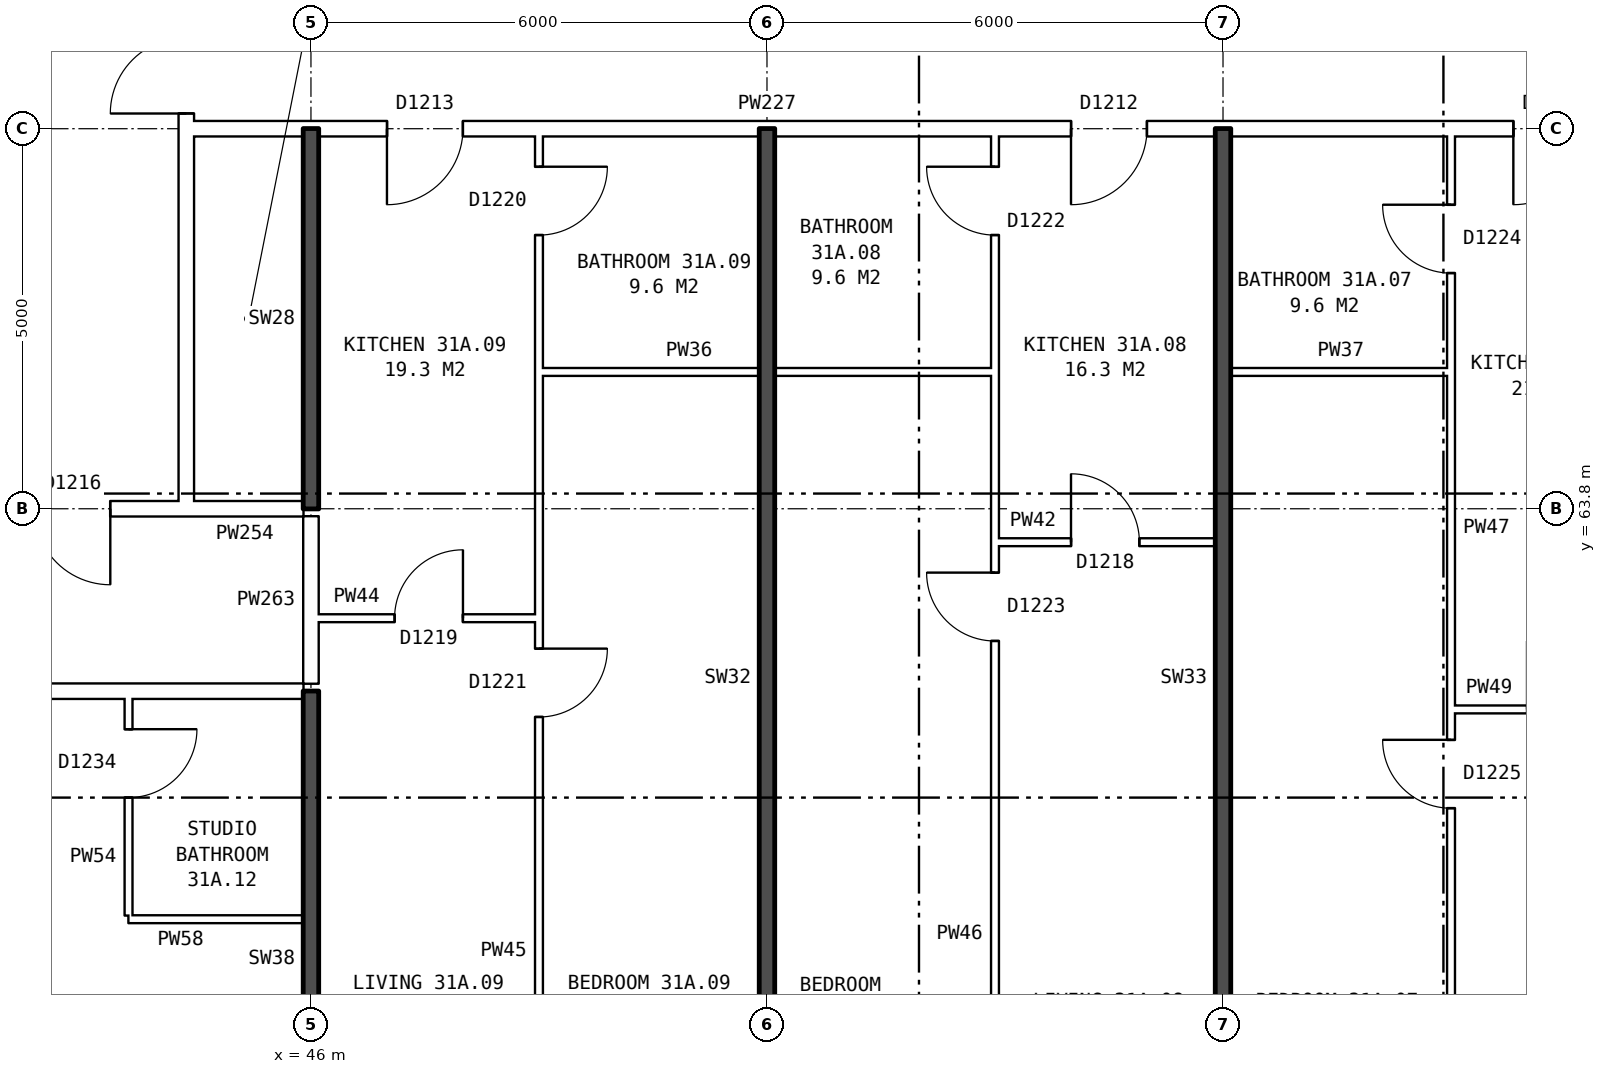
"""IFC4 building model, lengths in metres.
Left out: names, types, materials, properties, quantities, classifications, styles, units other than length and angle.
Written with IfcOpenShell. Run it as: python <this file> out.ifc"""

import sys

from ifc_helpers import new_model, si_unit, direction, frame, frame_2d, origin, place, context, subcontext, project, spatial, rectangle, extrude, element, fill, save


model = new_model("IFC4")
c1 = context("Model", 3, precision=1e-05, world=origin(), true_north=direction((0.0, 1.0)))
c2 = subcontext(c1, "Body", "Model", "MODEL_VIEW")
j1 = project(units=[si_unit("LENGTHUNIT", "METRE"), si_unit("PLANEANGLEUNIT", "RADIAN")], contexts=[c1])
p1 = place(None, origin())
s1 = spatial("IfcSite", under=j1, at=p1, CompositionType="ELEMENT")
p2 = place(p1, origin())
s2 = spatial("IfcBuilding", under=s1, at=p2, CompositionType="ELEMENT")
p3 = place(p2, frame((0.0, 0.0, 111.9)))
s3 = spatial("IfcBuildingStorey", under=s2, at=p3, CompositionType="ELEMENT", Elevation=111.9)
p4 = place(p3, frame((44.36, 63.9, 0.0), z_axis=(0.0, 0.0, 1.0), x_axis=(0.0, 1.0, 0.0)))
e1 = element("IfcWall", 1, at=p4, inside=s3, PredefinedType="PARTITIONING", context=c2, shape_type="SweptSolid", body=[
    extrude(rectangle(XDim=12.2, YDim=0.2, at=frame_2d((6.1, 0.0))), origin(), (0.0, 0.0, 1.0), 2.85),
])
p5 = place(p4, frame((5.1, 0.0, 0.0)))
e2 = element("IfcOpeningElement", 2, at=p5, cuts=e1, PredefinedType="OPENING", context=c2, shape_type="SweptSolid", body=[
    extrude(rectangle(XDim=2.0, YDim=2.1, at=frame_2d((1.0, 1.05))), frame((0.0, 0.11, 0.0), z_axis=(0.0, -1.0, 0.0), x_axis=(1.0, 0.0, 0.0)), (0.0, 0.0, 1.0), 0.22),
])
p6 = place(p3, frame((43.6, 58.4, 0.0), z_axis=(0.0, 0.0, 1.0), x_axis=(1.0, 0.0, 0.0)))
e3 = element("IfcWall", 3, at=p6, inside=s3, PredefinedType="PARTITIONING", context=c2, shape_type="SweptSolid", body=[
    extrude(rectangle(XDim=2.3, YDim=0.1, at=frame_2d((1.15, 0.0))), origin(), (0.0, 0.0, 1.0), 2.85),
])
p7 = place(p3, frame((61.0, 61.16, 0.0), z_axis=(0.0, 0.0, 1.0), x_axis=(1.0, 0.0, 0.0)))
e4 = element("IfcWall", 4, at=p7, inside=s3, PredefinedType="PARTITIONING", context=c2, shape_type="SweptSolid", body=[
    extrude(rectangle(XDim=2.9, YDim=0.1, at=frame_2d((1.45, 0.0))), origin(), (0.0, 0.0, 1.0), 2.85),
])
p8 = place(p7, frame((1.0, 0.0, 0.0)))
e5 = element("IfcOpeningElement", 5, at=p8, cuts=e4, PredefinedType="OPENING", context=c2, shape_type="SweptSolid", body=[
    extrude(rectangle(XDim=0.9, YDim=2.1, at=frame_2d((0.45, 1.05))), frame((0.0, 0.06, 0.0), z_axis=(0.0, -1.0, 0.0), x_axis=(1.0, 0.0, 0.0)), (0.0, 0.0, 1.0), 0.12),
])
p9 = place(p3, frame((25.36, 61.4, 0.0), z_axis=(0.0, 0.0, 1.0), x_axis=(1.0, 0.0, 0.0)))
e6 = element("IfcWall", 6, at=p9, inside=s3, PredefinedType="PARTITIONING", context=c2, shape_type="SweptSolid", body=[
    extrude(rectangle(XDim=20.54, YDim=0.2, at=frame_2d((10.27, 0.0))), origin(), (0.0, 0.0, 1.0), 2.85),
])
p10 = place(p9, frame((15.94, 0.0, 0.0)))
e7 = element("IfcOpeningElement", 7, at=p10, cuts=e6, PredefinedType="OPENING", context=c2, shape_type="SweptSolid", body=[
    extrude(rectangle(XDim=1.0, YDim=2.1, at=frame_2d((0.5, 1.05))), frame((0.0, 0.11, 0.0), z_axis=(0.0, -1.0, 0.0), x_axis=(1.0, 0.0, 0.0)), (0.0, 0.0, 1.0), 0.22),
])
p11 = place(p9, frame((9.94, 0.0, 0.0)))
e8 = element("IfcOpeningElement", 8, at=p11, cuts=e6, PredefinedType="OPENING", context=c2, shape_type="SweptSolid", body=[
    extrude(rectangle(XDim=1.0, YDim=2.1, at=frame_2d((0.5, 1.05))), frame((0.0, 0.11, 0.0), z_axis=(0.0, -1.0, 0.0), x_axis=(1.0, 0.0, 0.0)), (0.0, 0.0, 1.0), 0.22),
])
p12 = place(p9, frame((2.62, 0.0, 0.0)))
e9 = element("IfcOpeningElement", 9, at=p12, cuts=e6, PredefinedType="OPENING", context=c2, shape_type="SweptSolid", body=[
    extrude(rectangle(XDim=1.0, YDim=2.1, at=frame_2d((0.5, 1.05))), frame((0.0, 0.11, 0.0), z_axis=(0.0, -1.0, 0.0), x_axis=(1.0, 0.0, 0.0)), (0.0, 0.0, 1.0), 0.22),
])
p13 = place(p3, frame((46.1, 62.36, 0.0), z_axis=(0.0, 0.0, 1.0), x_axis=(1.0, 0.0, 0.0)))
e10 = element("IfcWall", 10, at=p13, inside=s3, PredefinedType="PARTITIONING", context=c2, shape_type="SweptSolid", body=[
    extrude(rectangle(XDim=2.9, YDim=0.1, at=frame_2d((1.45, 0.0))), origin(), (0.0, 0.0, 1.0), 2.85),
])
p14 = place(p13, frame((1.0, 0.0, 0.0)))
e11 = element("IfcOpeningElement", 11, at=p14, cuts=e10, PredefinedType="OPENING", context=c2, shape_type="SweptSolid", body=[
    extrude(rectangle(XDim=0.9, YDim=2.1, at=frame_2d((0.45, 1.05))), frame((0.0, 0.06, 0.0), z_axis=(0.0, -1.0, 0.0), x_axis=(1.0, 0.0, 0.0)), (0.0, 0.0, 1.0), 0.12),
])
p15 = place(p3, frame((55.0, 63.36, 0.0), z_axis=(0.0, 0.0, 1.0), x_axis=(1.0, 0.0, 0.0)))
e12 = element("IfcWall", 12, at=p15, inside=s3, PredefinedType="PARTITIONING", context=c2, shape_type="SweptSolid", body=[
    extrude(rectangle(XDim=2.9, YDim=0.1, at=frame_2d((1.45, 0.0))), origin(), (0.0, 0.0, 1.0), 2.85),
])
p16 = place(p15, frame((1.0, 0.0, 0.0)))
e13 = element("IfcOpeningElement", 13, at=p16, cuts=e12, PredefinedType="OPENING", context=c2, shape_type="SweptSolid", body=[
    extrude(rectangle(XDim=0.9, YDim=2.1, at=frame_2d((0.45, 1.05))), frame((0.0, 0.06, 0.0), z_axis=(0.0, -1.0, 0.0), x_axis=(1.0, 0.0, 0.0)), (0.0, 0.0, 1.0), 0.12),
])
p17 = place(p3, frame((41.36, 63.8, 0.0), z_axis=(0.0, 0.0, 1.0), x_axis=(1.0, 0.0, 0.0)))
e14 = element("IfcWall", 14, at=p17, inside=s3, PredefinedType="PARTITIONING", context=c2, shape_type="SweptSolid", body=[
    extrude(rectangle(XDim=3.0, YDim=0.2, at=frame_2d((1.5, 0.0))), origin(), (0.0, 0.0, 1.0), 2.85),
])
p18 = place(p17, frame((1.0, 0.0, 0.0)))
e15 = element("IfcOpeningElement", 15, at=p18, cuts=e14, PredefinedType="OPENING", context=c2, shape_type="SweptSolid", body=[
    extrude(rectangle(XDim=1.0, YDim=2.1, at=frame_2d((0.5, 1.05))), frame((0.0, 0.11, 0.0), z_axis=(0.0, -1.0, 0.0), x_axis=(1.0, 0.0, 0.0)), (0.0, 0.0, 1.0), 0.22),
])
p19 = place(p3, frame((44.36, 63.8, 0.0), z_axis=(0.0, 0.0, 1.0), x_axis=(1.0, 0.0, 0.0)))
e16 = element("IfcWall", 16, at=p19, inside=s3, PredefinedType="PARTITIONING", context=c2, shape_type="SweptSolid", body=[
    extrude(rectangle(XDim=1.54, YDim=0.2, at=frame_2d((0.77, 0.0))), origin(), (0.0, 0.0, 1.0), 2.85),
])
p20 = place(p3, frame((49.0, 65.6, 0.0), z_axis=(0.0, 0.0, 1.0), x_axis=(1.0, 0.0, 0.0)))
e17 = element("IfcWall", 17, at=p20, inside=s3, PredefinedType="PARTITIONING", context=c2, shape_type="SweptSolid", body=[
    extrude(rectangle(XDim=6.0, YDim=0.1, at=frame_2d((3.0, 0.0))), origin(), (0.0, 0.0, 1.0), 2.85),
])
p21 = place(p3, frame((58.1, 65.6, 0.0), z_axis=(0.0, 0.0, 1.0), x_axis=(1.0, 0.0, 0.0)))
e18 = element("IfcWall", 18, at=p21, inside=s3, PredefinedType="PARTITIONING", context=c2, shape_type="SweptSolid", body=[
    extrude(rectangle(XDim=2.9, YDim=0.1, at=frame_2d((1.45, 0.0))), origin(), (0.0, 0.0, 1.0), 2.85),
])
p22 = place(p3, frame((44.36, 68.8, 0.0), z_axis=(0.0, 0.0, 1.0), x_axis=(1.0, 0.0, 0.0)))
e19 = element("IfcWall", 19, at=p22, inside=s3, PredefinedType="PARTITIONING", context=c2, shape_type="SweptSolid", body=[
    extrude(rectangle(XDim=19.28, YDim=0.2, at=frame_2d((9.64, 0.0))), origin(), (0.0, 0.0, 1.0), 2.85),
])
p23 = place(p22, frame((17.46, 0.0, 0.0)))
e20 = element("IfcOpeningElement", 20, at=p23, cuts=e19, PredefinedType="OPENING", context=c2, shape_type="SweptSolid", body=[
    extrude(rectangle(XDim=1.0, YDim=2.1, at=frame_2d((0.5, 1.05))), frame((0.0, 0.11, 0.0), z_axis=(0.0, -1.0, 0.0), x_axis=(1.0, 0.0, 0.0)), (0.0, 0.0, 1.0), 0.22),
])
p24 = place(p22, frame((11.64, 0.0, 0.0)))
e21 = element("IfcOpeningElement", 21, at=p24, cuts=e19, PredefinedType="OPENING", context=c2, shape_type="SweptSolid", body=[
    extrude(rectangle(XDim=1.0, YDim=2.1, at=frame_2d((0.5, 1.05))), frame((0.0, 0.11, 0.0), z_axis=(0.0, -1.0, 0.0), x_axis=(1.0, 0.0, 0.0)), (0.0, 0.0, 1.0), 0.22),
])
p25 = place(p22, frame((2.64, 0.0, 0.0)))
e22 = element("IfcOpeningElement", 22, at=p25, cuts=e19, PredefinedType="OPENING", context=c2, shape_type="SweptSolid", body=[
    extrude(rectangle(XDim=1.0, YDim=2.1, at=frame_2d((0.5, 1.05))), frame((0.0, 0.11, 0.0), z_axis=(0.0, -1.0, 0.0), x_axis=(1.0, 0.0, 0.0)), (0.0, 0.0, 1.0), 0.22),
])
p26 = place(p3, frame((43.6, 58.45, 0.0), z_axis=(0.0, 0.0, 1.0), x_axis=(0.0, 1.0, 0.0)))
e23 = element("IfcWall", 23, at=p26, inside=s3, PredefinedType="PARTITIONING", context=c2, shape_type="SweptSolid", body=[
    extrude(rectangle(XDim=2.85, YDim=0.1, at=frame_2d((1.425, 0.0))), origin(), (0.0, 0.0, 1.0), 2.85),
])
p27 = place(p26, frame((1.55, 0.0, 0.0)))
e24 = element("IfcOpeningElement", 24, at=p27, cuts=e23, PredefinedType="OPENING", context=c2, shape_type="SweptSolid", body=[
    extrude(rectangle(XDim=0.9, YDim=2.1, at=frame_2d((0.45, 1.05))), frame((0.0, 0.06, 0.0), z_axis=(0.0, -1.0, 0.0), x_axis=(1.0, 0.0, 0.0)), (0.0, 0.0, 1.0), 0.12),
])
p28 = place(p3, frame((46.0, 54.36, 0.0), z_axis=(0.0, 0.0, 1.0), x_axis=(0.0, 1.0, 0.0)))
e25 = element("IfcWall", 25, at=p28, inside=s3, PredefinedType="SOLIDWALL", context=c2, shape_type="SweptSolid", body=[
    extrude(rectangle(XDim=7.04, YDim=0.2, at=frame_2d((3.52, 0.0))), origin(), (0.0, 0.0, 1.0), 2.85),
])
p29 = place(p3, frame((46.0, 61.5, 0.0), z_axis=(0.0, 0.0, 1.0), x_axis=(0.0, 1.0, 0.0)))
e26 = element("IfcWall", 26, at=p29, inside=s3, PredefinedType="PARTITIONING", context=c2, shape_type="SweptSolid", body=[
    extrude(rectangle(XDim=2.2, YDim=0.2, at=frame_2d((1.1, 0.0))), origin(), (0.0, 0.0, 1.0), 2.85),
])
p30 = place(p3, frame((46.0, 63.8, 0.0), z_axis=(0.0, 0.0, 1.0), x_axis=(0.0, 1.0, 0.0)))
e27 = element("IfcWall", 27, at=p30, inside=s3, PredefinedType="SOLIDWALL", context=c2, shape_type="SweptSolid", body=[
    extrude(rectangle(XDim=5.0, YDim=0.2, at=frame_2d((2.5, 0.0))), origin(), (0.0, 0.0, 1.0), 2.85),
])
p31 = place(p3, frame((49.0, 54.36, 0.0), z_axis=(0.0, 0.0, 1.0), x_axis=(0.0, 1.0, 0.0)))
e28 = element("IfcWall", 28, at=p31, inside=s3, PredefinedType="PARTITIONING", context=c2, shape_type="SweptSolid", body=[
    extrude(rectangle(XDim=14.34, YDim=0.1, at=frame_2d((7.17, 0.0))), origin(), (0.0, 0.0, 1.0), 2.85),
])
p32 = place(p31, frame((6.7, 0.0, 0.0)))
e29 = element("IfcOpeningElement", 29, at=p32, cuts=e28, PredefinedType="OPENING", context=c2, shape_type="SweptSolid", body=[
    extrude(rectangle(XDim=0.9, YDim=2.1, at=frame_2d((0.45, 1.05))), frame((0.0, 0.06, 0.0), z_axis=(0.0, -1.0, 0.0), x_axis=(1.0, 0.0, 0.0)), (0.0, 0.0, 1.0), 0.12),
])
p33 = place(p31, frame((13.04, 0.0, 0.0)))
e30 = element("IfcOpeningElement", 30, at=p33, cuts=e28, PredefinedType="OPENING", context=c2, shape_type="SweptSolid", body=[
    extrude(rectangle(XDim=0.9, YDim=2.1, at=frame_2d((0.45, 1.05))), frame((0.0, 0.06, 0.0), z_axis=(0.0, -1.0, 0.0), x_axis=(1.0, 0.0, 0.0)), (0.0, 0.0, 1.0), 0.12),
])
p34 = place(p3, frame((52.0, 54.36, 0.0), z_axis=(0.0, 0.0, 1.0), x_axis=(0.0, 1.0, 0.0)))
e31 = element("IfcWall", 31, at=p34, inside=s3, PredefinedType="SOLIDWALL", context=c2, shape_type="SweptSolid", body=[
    extrude(rectangle(XDim=14.44, YDim=0.2, at=frame_2d((7.22, 0.0))), origin(), (0.0, 0.0, 1.0), 2.85),
])
p35 = place(p3, frame((55.0, 54.36, 0.0), z_axis=(0.0, 0.0, 1.0), x_axis=(0.0, 1.0, 0.0)))
e32 = element("IfcWall", 32, at=p35, inside=s3, PredefinedType="PARTITIONING", context=c2, shape_type="SweptSolid", body=[
    extrude(rectangle(XDim=14.34, YDim=0.1, at=frame_2d((7.17, 0.0))), origin(), (0.0, 0.0, 1.0), 2.85),
])
p36 = place(p35, frame((7.7, 0.0, 0.0)))
e33 = element("IfcOpeningElement", 33, at=p36, cuts=e32, PredefinedType="OPENING", context=c2, shape_type="SweptSolid", body=[
    extrude(rectangle(XDim=0.9, YDim=2.1, at=frame_2d((0.45, 1.05))), frame((0.0, 0.06, 0.0), z_axis=(0.0, -1.0, 0.0), x_axis=(1.0, 0.0, 0.0)), (0.0, 0.0, 1.0), 0.12),
])
p37 = place(p35, frame((13.04, 0.0, 0.0)))
e34 = element("IfcOpeningElement", 34, at=p37, cuts=e32, PredefinedType="OPENING", context=c2, shape_type="SweptSolid", body=[
    extrude(rectangle(XDim=0.9, YDim=2.1, at=frame_2d((0.45, 1.05))), frame((0.0, 0.06, 0.0), z_axis=(0.0, -1.0, 0.0), x_axis=(1.0, 0.0, 0.0)), (0.0, 0.0, 1.0), 0.12),
])
p38 = place(p3, frame((58.0, 54.36, 0.0), z_axis=(0.0, 0.0, 1.0), x_axis=(0.0, 1.0, 0.0)))
e35 = element("IfcWall", 35, at=p38, inside=s3, PredefinedType="SOLIDWALL", context=c2, shape_type="SweptSolid", body=[
    extrude(rectangle(XDim=14.44, YDim=0.2, at=frame_2d((7.22, 0.0))), origin(), (0.0, 0.0, 1.0), 2.85),
])
p39 = place(p3, frame((61.0, 54.36, 0.0), z_axis=(0.0, 0.0, 1.0), x_axis=(0.0, 1.0, 0.0)))
e36 = element("IfcWall", 36, at=p39, inside=s3, PredefinedType="PARTITIONING", context=c2, shape_type="SweptSolid", body=[
    extrude(rectangle(XDim=14.34, YDim=0.1, at=frame_2d((7.17, 0.0))), origin(), (0.0, 0.0, 1.0), 2.85),
])
p40 = place(p39, frame((5.5, 0.0, 0.0)))
e37 = element("IfcOpeningElement", 37, at=p40, cuts=e36, PredefinedType="OPENING", context=c2, shape_type="SweptSolid", body=[
    extrude(rectangle(XDim=0.9, YDim=2.1, at=frame_2d((0.45, 1.05))), frame((0.0, 0.06, 0.0), z_axis=(0.0, -1.0, 0.0), x_axis=(1.0, 0.0, 0.0)), (0.0, 0.0, 1.0), 0.12),
])
p41 = place(p39, frame((12.54, 0.0, 0.0)))
e38 = element("IfcOpeningElement", 38, at=p41, cuts=e36, PredefinedType="OPENING", context=c2, shape_type="SweptSolid", body=[
    extrude(rectangle(XDim=0.9, YDim=2.1, at=frame_2d((0.45, 1.05))), frame((0.0, 0.06, 0.0), z_axis=(0.0, -1.0, 0.0), x_axis=(1.0, 0.0, 0.0)), (0.0, 0.0, 1.0), 0.12),
])
p42 = place(p5, origin())
e39 = element("IfcDoor", 39, at=p42, inside=s3, OperationType="DOUBLE_DOOR_SINGLE_SWING", PredefinedType="DOOR", context=c2, shape_type="SweptSolid", body=[
    extrude(rectangle(XDim=2.0, YDim=2.1, at=frame_2d((1.0, 1.05))), frame((0.0, 0.025, 0.0), z_axis=(0.0, -1.0, 0.0), x_axis=(1.0, 0.0, 0.0)), (0.0, 0.0, 1.0), 0.05),
])
fill(e2, e39)
p43 = place(p18, frame((1.0, 0.0, 0.0), z_axis=(0.0, 0.0, 1.0), x_axis=(-1.0, 0.0, 0.0)))
e40 = element("IfcDoor", 40, at=p43, inside=s3, OperationType="SINGLE_SWING_LEFT", PredefinedType="DOOR", context=c2, shape_type="SweptSolid", body=[
    extrude(rectangle(XDim=1.0, YDim=2.1, at=frame_2d((0.5, 1.05))), frame((0.0, 0.025, 0.0), z_axis=(0.0, -1.0, 0.0), x_axis=(1.0, 0.0, 0.0)), (0.0, 0.0, 1.0), 0.05),
])
fill(e15, e40)
p44 = place(p40, origin())
e41 = element("IfcDoor", 41, at=p44, inside=s3, OperationType="SINGLE_SWING_RIGHT", PredefinedType="DOOR", context=c2, shape_type="SweptSolid", body=[
    extrude(rectangle(XDim=0.9, YDim=2.1, at=frame_2d((0.45, 1.05))), frame((0.0, 0.025, 0.0), z_axis=(0.0, -1.0, 0.0), x_axis=(1.0, 0.0, 0.0)), (0.0, 0.0, 1.0), 0.05),
])
fill(e37, e41)
p45 = place(p23, frame((1.0, 0.0, 0.0), z_axis=(0.0, 0.0, 1.0), x_axis=(-1.0, 0.0, 0.0)))
e42 = element("IfcDoor", 42, at=p45, inside=s3, OperationType="SINGLE_SWING_RIGHT", PredefinedType="DOOR", context=c2, shape_type="SweptSolid", body=[
    extrude(rectangle(XDim=1.0, YDim=2.1, at=frame_2d((0.5, 1.05))), frame((0.0, 0.025, 0.0), z_axis=(0.0, -1.0, 0.0), x_axis=(1.0, 0.0, 0.0)), (0.0, 0.0, 1.0), 0.05),
])
fill(e20, e42)
p46 = place(p41, origin())
e43 = element("IfcDoor", 43, at=p46, inside=s3, OperationType="SINGLE_SWING_RIGHT", PredefinedType="DOOR", context=c2, shape_type="SweptSolid", body=[
    extrude(rectangle(XDim=0.9, YDim=2.1, at=frame_2d((0.45, 1.05))), frame((0.0, 0.025, 0.0), z_axis=(0.0, -1.0, 0.0), x_axis=(1.0, 0.0, 0.0)), (0.0, 0.0, 1.0), 0.05),
])
fill(e38, e43)
p47 = place(p36, origin())
e44 = element("IfcDoor", 44, at=p47, inside=s3, OperationType="SINGLE_SWING_RIGHT", PredefinedType="DOOR", context=c2, shape_type="SweptSolid", body=[
    extrude(rectangle(XDim=0.9, YDim=2.1, at=frame_2d((0.45, 1.05))), frame((0.0, 0.025, 0.0), z_axis=(0.0, -1.0, 0.0), x_axis=(1.0, 0.0, 0.0)), (0.0, 0.0, 1.0), 0.05),
])
fill(e33, e44)
p48 = place(p24, frame((1.0, 0.0, 0.0), z_axis=(0.0, 0.0, 1.0), x_axis=(-1.0, 0.0, 0.0)))
e45 = element("IfcDoor", 45, at=p48, inside=s3, OperationType="SINGLE_SWING_RIGHT", PredefinedType="DOOR", context=c2, shape_type="SweptSolid", body=[
    extrude(rectangle(XDim=1.0, YDim=2.1, at=frame_2d((0.5, 1.05))), frame((0.0, 0.025, 0.0), z_axis=(0.0, -1.0, 0.0), x_axis=(1.0, 0.0, 0.0)), (0.0, 0.0, 1.0), 0.05),
])
fill(e21, e45)
p49 = place(p16, origin())
e46 = element("IfcDoor", 46, at=p49, inside=s3, OperationType="SINGLE_SWING_LEFT", PredefinedType="DOOR", context=c2, shape_type="SweptSolid", body=[
    extrude(rectangle(XDim=0.9, YDim=2.1, at=frame_2d((0.45, 1.05))), frame((0.0, 0.025, 0.0), z_axis=(0.0, -1.0, 0.0), x_axis=(1.0, 0.0, 0.0)), (0.0, 0.0, 1.0), 0.05),
])
fill(e13, e46)
p50 = place(p37, origin())
e47 = element("IfcDoor", 47, at=p50, inside=s3, OperationType="SINGLE_SWING_RIGHT", PredefinedType="DOOR", context=c2, shape_type="SweptSolid", body=[
    extrude(rectangle(XDim=0.9, YDim=2.1, at=frame_2d((0.45, 1.05))), frame((0.0, 0.025, 0.0), z_axis=(0.0, -1.0, 0.0), x_axis=(1.0, 0.0, 0.0)), (0.0, 0.0, 1.0), 0.05),
])
fill(e34, e47)
p51 = place(p32, frame((0.9, 0.0, 0.0), z_axis=(0.0, 0.0, 1.0), x_axis=(-1.0, 0.0, 0.0)))
e48 = element("IfcDoor", 48, at=p51, inside=s3, OperationType="SINGLE_SWING_LEFT", PredefinedType="DOOR", context=c2, shape_type="SweptSolid", body=[
    extrude(rectangle(XDim=0.9, YDim=2.1, at=frame_2d((0.45, 1.05))), frame((0.0, 0.025, 0.0), z_axis=(0.0, -1.0, 0.0), x_axis=(1.0, 0.0, 0.0)), (0.0, 0.0, 1.0), 0.05),
])
fill(e29, e48)
p52 = place(p25, frame((1.0, 0.0, 0.0), z_axis=(0.0, 0.0, 1.0), x_axis=(-1.0, 0.0, 0.0)))
e49 = element("IfcDoor", 49, at=p52, inside=s3, OperationType="SINGLE_SWING_RIGHT", PredefinedType="DOOR", context=c2, shape_type="SweptSolid", body=[
    extrude(rectangle(XDim=1.0, YDim=2.1, at=frame_2d((0.5, 1.05))), frame((0.0, 0.025, 0.0), z_axis=(0.0, -1.0, 0.0), x_axis=(1.0, 0.0, 0.0)), (0.0, 0.0, 1.0), 0.05),
])
fill(e22, e49)
p53 = place(p14, origin())
e50 = element("IfcDoor", 50, at=p53, inside=s3, OperationType="SINGLE_SWING_RIGHT", PredefinedType="DOOR", context=c2, shape_type="SweptSolid", body=[
    extrude(rectangle(XDim=0.9, YDim=2.1, at=frame_2d((0.45, 1.05))), frame((0.0, 0.025, 0.0), z_axis=(0.0, -1.0, 0.0), x_axis=(1.0, 0.0, 0.0)), (0.0, 0.0, 1.0), 0.05),
])
fill(e11, e50)
p54 = place(p33, frame((0.9, 0.0, 0.0), z_axis=(0.0, 0.0, 1.0), x_axis=(-1.0, 0.0, 0.0)))
e51 = element("IfcDoor", 51, at=p54, inside=s3, OperationType="SINGLE_SWING_LEFT", PredefinedType="DOOR", context=c2, shape_type="SweptSolid", body=[
    extrude(rectangle(XDim=0.9, YDim=2.1, at=frame_2d((0.45, 1.05))), frame((0.0, 0.025, 0.0), z_axis=(0.0, -1.0, 0.0), x_axis=(1.0, 0.0, 0.0)), (0.0, 0.0, 1.0), 0.05),
])
fill(e30, e51)
p55 = place(p27, frame((0.9, 0.0, 0.0), z_axis=(0.0, 0.0, 1.0), x_axis=(-1.0, 0.0, 0.0)))
e52 = element("IfcDoor", 52, at=p55, inside=s3, OperationType="SINGLE_SWING_LEFT", PredefinedType="DOOR", context=c2, shape_type="SweptSolid", body=[
    extrude(rectangle(XDim=0.9, YDim=2.1, at=frame_2d((0.45, 1.05))), frame((0.0, 0.025, 0.0), z_axis=(0.0, -1.0, 0.0), x_axis=(1.0, 0.0, 0.0)), (0.0, 0.0, 1.0), 0.05),
])
fill(e24, e52)
save(model, sys.argv[1])
